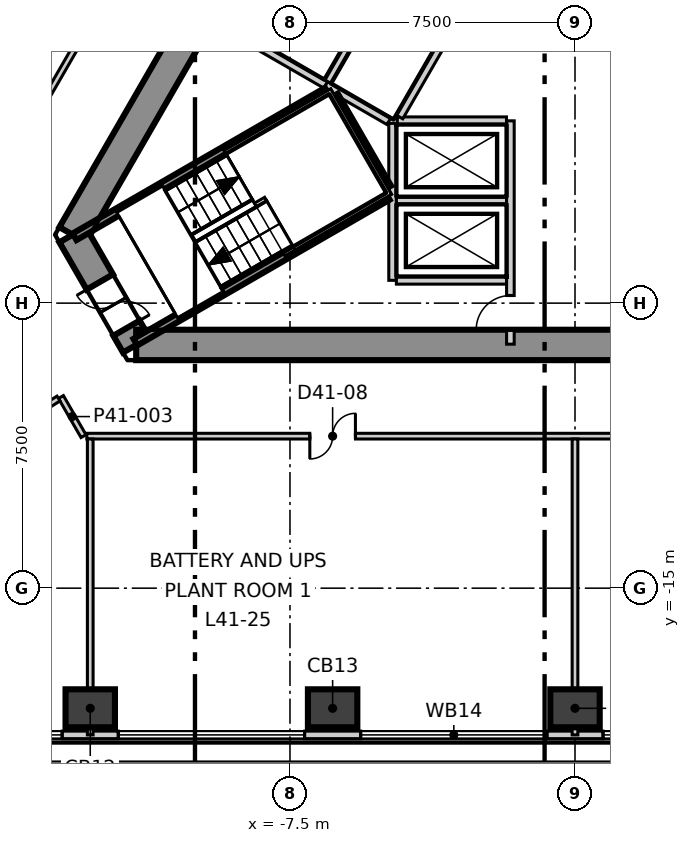
"""IFC4 building model, lengths in metres.
Left out: names, types, materials, properties, quantities, classifications, styles, units other than length and angle.
Written with IfcOpenShell. Run it as: python <this file> out.ifc"""

import sys

from ifc_helpers import new_model, si_unit, direction, frame, frame_2d, origin, origin_2d, place, context, subcontext, project, spatial, polyline, rectangle, outline, extrude, element, fill, save


model = new_model("IFC4")
c1 = context("Model", 3, precision=1e-05, world=origin(), true_north=direction((0.0, 1.0)))
c2 = subcontext(c1, "Body", "Model", "MODEL_VIEW")
j1 = project(units=[si_unit("LENGTHUNIT", "METRE"), si_unit("PLANEANGLEUNIT", "RADIAN")], contexts=[c1])
p1 = place(None, origin())
s1 = spatial("IfcSite", under=j1, at=p1, CompositionType="ELEMENT")
p2 = place(p1, origin())
s2 = spatial("IfcBuilding", under=s1, at=p2, CompositionType="ELEMENT")
p3 = place(p2, frame((0.0, 0.0, 176.3)))
s3 = spatial("IfcBuildingStorey", under=s2, at=p3, CompositionType="ELEMENT", Elevation=176.3)
p4 = place(p3, frame((-1.674, 14.3, -0.3), z_axis=(0.0, 0.0, 1.0), x_axis=(-0.499995765644, -0.866027848477, 0.0)))
e1 = element("IfcWall", 1, at=p4, inside=s3, PredefinedType="SHEAR", context=c2, shape_type="SweptSolid", body=[
    extrude(outline(polyline([(-0.231, -0.4), (1.732, -0.4), (3.695, -0.4), (5.658, -0.4), (7.621, -0.4), (9.584, -0.4), (11.547, -0.4), (13.51, -0.4), (15.473, -0.4), (17.436, -0.4), (19.399, -0.4), (21.362, -0.4), (23.325, -0.4), (22.863, 0.4), (20.977, 0.4), (19.091, 0.4), (17.205, 0.4), (15.319, 0.4), (13.433, 0.4), (11.547, 0.4), (9.661, 0.4), (7.775, 0.4), (5.889, 0.4), (4.003, 0.4), (2.117, 0.4), (0.231, 0.4), (-0.231, -0.4)])), origin(), (0.0, 0.0, 1.0), 4.2),
])
p5 = place(p4, frame((10.997, 0.0, 0.3)))
e2 = element("IfcOpeningElement", 2, at=p5, cuts=e1, PredefinedType="OPENING", context=c2, shape_type="SweptSolid", body=[
    extrude(rectangle(XDim=1.1, YDim=2.1, at=frame_2d((0.55, 1.05))), frame((0.0, 0.41, 0.0), z_axis=(0.0, -1.0, 0.0), x_axis=(1.0, 0.0, 0.0)), (0.0, 0.0, 1.0), 0.82),
])
p6 = place(p3, frame((-13.221, -5.7, -0.3), z_axis=(0.0, 0.0, 1.0), x_axis=(0.49987182685, -0.866099391942, 0.0)))
e3 = element("IfcWall", 3, at=p6, inside=s3, PredefinedType="SHEAR", context=c2, shape_type="SweptSolid", body=[
    extrude(outline(polyline([(-0.231, -0.4), (1.674, -0.4), (3.579, -0.4), (3.118, 0.4), (1.674, 0.4), (0.231, 0.4), (-0.231, -0.4)])), origin(), (0.0, 0.0, 1.0), 4.2),
])
p7 = place(p6, frame((1.437, 0.0, 0.3)))
e4 = element("IfcOpeningElement", 4, at=p7, cuts=e3, PredefinedType="OPENING", context=c2, shape_type="SweptSolid", body=[
    extrude(rectangle(XDim=1.4, YDim=2.1, at=frame_2d((0.7, 1.05))), frame((0.0, 0.41, 0.0), z_axis=(0.0, -1.0, 0.0), x_axis=(1.0, 0.0, 0.0)), (0.0, 0.0, 1.0), 0.82),
])
p8 = place(p3, frame((-11.547, -8.6, -0.3), z_axis=(0.0, 0.0, 1.0), x_axis=(1.0, 0.0, 0.0)))
e5 = element("IfcWall", 5, at=p8, inside=s3, PredefinedType="SHEAR", context=c2, shape_type="SweptSolid", body=[
    extrude(outline(polyline([(-0.231, -0.4), (1.732, -0.4), (3.695, -0.4), (5.658, -0.4), (7.621, -0.4), (9.584, -0.4), (11.547, -0.4), (13.51, -0.4), (15.473, -0.4), (17.436, -0.4), (19.399, -0.4), (21.362, -0.4), (23.325, -0.4), (22.863, 0.4), (20.977, 0.4), (19.091, 0.4), (17.205, 0.4), (15.319, 0.4), (13.433, 0.4), (11.547, 0.4), (9.661, 0.4), (7.775, 0.4), (5.889, 0.4), (4.003, 0.4), (2.117, 0.4), (0.231, 0.4), (-0.231, -0.4)])), origin(), (0.0, 0.0, 1.0), 4.2),
])
for number, where, z_axis, x_axis in (
    (6, (-12.756, -18.161, -0.3), (0.0, 0.0, 1.0), (1.0, 0.0, 0.0)),
    (7, (-6.378, -18.161, -0.3), (0.0, 0.0, 1.0), (1.0, 0.0, 0.0)),
    (8, (0.0, -18.161, -0.3), (0.0, 0.0, 1.0), (1.0, 0.0, 0.0)),
):
    element("IfcColumn", number, at=place(p3, frame(where, z_axis=z_axis, x_axis=x_axis)), inside=s3, PredefinedType="COLUMN", context=c2, shape_type="SweptSolid", body=[
        extrude(rectangle(XDim=1.3, YDim=1.0, at=origin_2d()), origin(), (0.0, 0.0, 1.0), 4.2),
    ])
p9 = place(p3, frame((-2.926, 32.654, 0.0), z_axis=(0.0, 0.0, 1.0), x_axis=(-0.499994049952, -0.866028839019, 0.0)))
e9 = element("IfcWall", 9, at=p9, inside=s3, PredefinedType="ELEMENTEDWALL", context=c2, shape_type="SweptSolid", body=[
    extrude(rectangle(XDim=53.613, YDim=0.2, at=frame_2d((26.806, 0.0))), origin(), (0.0, 0.0, 1.0), 3.9),
])
p10 = place(p9, frame((2.042, 0.0, 0.9)))
e10 = element("IfcOpeningElement", 10, at=p10, cuts=e9, PredefinedType="OPENING", context=c2, shape_type="SweptSolid", body=[
    extrude(rectangle(XDim=4.9, YDim=2.5, at=frame_2d((2.45, 1.25))), frame((0.0, 0.11, 0.0), z_axis=(0.0, -1.0, 0.0), x_axis=(1.0, 0.0, 0.0)), (0.0, 0.0, 1.0), 0.22),
])
p11 = place(p9, frame((8.42, 0.0, 0.9)))
e11 = element("IfcOpeningElement", 11, at=p11, cuts=e9, PredefinedType="OPENING", context=c2, shape_type="SweptSolid", body=[
    extrude(rectangle(XDim=4.9, YDim=2.5, at=frame_2d((2.45, 1.25))), frame((0.0, 0.11, 0.0), z_axis=(0.0, -1.0, 0.0), x_axis=(1.0, 0.0, 0.0)), (0.0, 0.0, 1.0), 0.22),
])
p12 = place(p9, frame((14.798, 0.0, 0.9)))
e12 = element("IfcOpeningElement", 12, at=p12, cuts=e9, PredefinedType="OPENING", context=c2, shape_type="SweptSolid", body=[
    extrude(rectangle(XDim=4.9, YDim=2.5, at=frame_2d((2.45, 1.25))), frame((0.0, 0.11, 0.0), z_axis=(0.0, -1.0, 0.0), x_axis=(1.0, 0.0, 0.0)), (0.0, 0.0, 1.0), 0.22),
])
p13 = place(p9, frame((21.177, 0.0, 0.9)))
e13 = element("IfcOpeningElement", 13, at=p13, cuts=e9, PredefinedType="OPENING", context=c2, shape_type="SweptSolid", body=[
    extrude(rectangle(XDim=4.9, YDim=2.5, at=frame_2d((2.45, 1.25))), frame((0.0, 0.11, 0.0), z_axis=(0.0, -1.0, 0.0), x_axis=(1.0, 0.0, 0.0)), (0.0, 0.0, 1.0), 0.22),
])
p14 = place(p9, frame((27.555, 0.0, 0.9)))
e14 = element("IfcOpeningElement", 14, at=p14, cuts=e9, PredefinedType="OPENING", context=c2, shape_type="SweptSolid", body=[
    extrude(rectangle(XDim=4.9, YDim=2.5, at=frame_2d((2.45, 1.25))), frame((0.0, 0.11, 0.0), z_axis=(0.0, -1.0, 0.0), x_axis=(1.0, 0.0, 0.0)), (0.0, 0.0, 1.0), 0.22),
])
p15 = place(p9, frame((33.934, 0.0, 0.9)))
e15 = element("IfcOpeningElement", 15, at=p15, cuts=e9, PredefinedType="OPENING", context=c2, shape_type="SweptSolid", body=[
    extrude(rectangle(XDim=4.9, YDim=2.5, at=frame_2d((2.45, 1.25))), frame((0.0, 0.11, 0.0), z_axis=(0.0, -1.0, 0.0), x_axis=(1.0, 0.0, 0.0)), (0.0, 0.0, 1.0), 0.22),
])
p16 = place(p9, frame((40.312, 0.0, 0.9)))
e16 = element("IfcOpeningElement", 16, at=p16, cuts=e9, PredefinedType="OPENING", context=c2, shape_type="SweptSolid", body=[
    extrude(rectangle(XDim=4.9, YDim=2.5, at=frame_2d((2.45, 1.25))), frame((0.0, 0.11, 0.0), z_axis=(0.0, -1.0, 0.0), x_axis=(1.0, 0.0, 0.0)), (0.0, 0.0, 1.0), 0.22),
])
p17 = place(p9, frame((46.69, 0.0, 0.9)))
e17 = element("IfcOpeningElement", 17, at=p17, cuts=e9, PredefinedType="OPENING", context=c2, shape_type="SweptSolid", body=[
    extrude(rectangle(XDim=4.9, YDim=2.5, at=frame_2d((2.45, 1.25))), frame((0.0, 0.11, 0.0), z_axis=(0.0, -1.0, 0.0), x_axis=(1.0, 0.0, 0.0)), (0.0, 0.0, 1.0), 0.22),
])
p18 = place(p3, frame((-26.816, -18.861, 0.0), z_axis=(0.0, 0.0, 1.0), x_axis=(1.0, 0.0, 0.0)))
e18 = element("IfcWall", 18, at=p18, inside=s3, PredefinedType="ELEMENTEDWALL", context=c2, shape_type="SweptSolid", body=[
    extrude(rectangle(XDim=53.612, YDim=0.2, at=frame_2d((26.806, 0.0))), origin(), (0.0, 0.0, 1.0), 3.9),
])
p19 = place(p18, frame((2.042, 0.0, 0.9)))
e19 = element("IfcOpeningElement", 19, at=p19, cuts=e18, PredefinedType="OPENING", context=c2, shape_type="SweptSolid", body=[
    extrude(rectangle(XDim=4.9, YDim=2.5, at=frame_2d((2.45, 1.25))), frame((0.0, 0.11, 0.0), z_axis=(0.0, -1.0, 0.0), x_axis=(1.0, 0.0, 0.0)), (0.0, 0.0, 1.0), 0.22),
])
p20 = place(p18, frame((8.42, 0.0, 0.9)))
e20 = element("IfcOpeningElement", 20, at=p20, cuts=e18, PredefinedType="OPENING", context=c2, shape_type="SweptSolid", body=[
    extrude(rectangle(XDim=4.9, YDim=2.5, at=frame_2d((2.45, 1.25))), frame((0.0, 0.11, 0.0), z_axis=(0.0, -1.0, 0.0), x_axis=(1.0, 0.0, 0.0)), (0.0, 0.0, 1.0), 0.22),
])
p21 = place(p18, frame((14.799, 0.0, 0.9)))
e21 = element("IfcOpeningElement", 21, at=p21, cuts=e18, PredefinedType="OPENING", context=c2, shape_type="SweptSolid", body=[
    extrude(rectangle(XDim=4.9, YDim=2.5, at=frame_2d((2.45, 1.25))), frame((0.0, 0.11, 0.0), z_axis=(0.0, -1.0, 0.0), x_axis=(1.0, 0.0, 0.0)), (0.0, 0.0, 1.0), 0.22),
])
p22 = place(p18, frame((21.177, 0.0, 0.9)))
e22 = element("IfcOpeningElement", 22, at=p22, cuts=e18, PredefinedType="OPENING", context=c2, shape_type="SweptSolid", body=[
    extrude(rectangle(XDim=4.9, YDim=2.5, at=frame_2d((2.45, 1.25))), frame((0.0, 0.11, 0.0), z_axis=(0.0, -1.0, 0.0), x_axis=(1.0, 0.0, 0.0)), (0.0, 0.0, 1.0), 0.22),
])
p23 = place(p18, frame((27.555, 0.0, 0.9)))
e23 = element("IfcOpeningElement", 23, at=p23, cuts=e18, PredefinedType="OPENING", context=c2, shape_type="SweptSolid", body=[
    extrude(rectangle(XDim=4.9, YDim=2.5, at=frame_2d((2.45, 1.25))), frame((0.0, 0.11, 0.0), z_axis=(0.0, -1.0, 0.0), x_axis=(1.0, 0.0, 0.0)), (0.0, 0.0, 1.0), 0.22),
])
p24 = place(p18, frame((33.933, 0.0, 0.9)))
e24 = element("IfcOpeningElement", 24, at=p24, cuts=e18, PredefinedType="OPENING", context=c2, shape_type="SweptSolid", body=[
    extrude(rectangle(XDim=4.9, YDim=2.5, at=frame_2d((2.45, 1.25))), frame((0.0, 0.11, 0.0), z_axis=(0.0, -1.0, 0.0), x_axis=(1.0, 0.0, 0.0)), (0.0, 0.0, 1.0), 0.22),
])
p25 = place(p18, frame((40.312, 0.0, 0.9)))
e25 = element("IfcOpeningElement", 25, at=p25, cuts=e18, PredefinedType="OPENING", context=c2, shape_type="SweptSolid", body=[
    extrude(rectangle(XDim=4.9, YDim=2.5, at=frame_2d((2.45, 1.25))), frame((0.0, 0.11, 0.0), z_axis=(0.0, -1.0, 0.0), x_axis=(1.0, 0.0, 0.0)), (0.0, 0.0, 1.0), 0.22),
])
p26 = place(p18, frame((46.69, 0.0, 0.9)))
e26 = element("IfcOpeningElement", 26, at=p26, cuts=e18, PredefinedType="OPENING", context=c2, shape_type="SweptSolid", body=[
    extrude(rectangle(XDim=4.9, YDim=2.5, at=frame_2d((2.45, 1.25))), frame((0.0, 0.11, 0.0), z_axis=(0.0, -1.0, 0.0), x_axis=(1.0, 0.0, 0.0)), (0.0, 0.0, 1.0), 0.22),
])
p27 = place(p3, frame((-15.993, -5.7, 0.0), z_axis=(0.0, 0.0, 1.0), x_axis=(0.500007877715, 0.866020855536, 0.0)))
e27 = element("IfcWall", 27, at=p27, inside=s3, PredefinedType="PARTITIONING", context=c2, shape_type="SweptSolid", body=[
    extrude(rectangle(XDim=25.865, YDim=0.15, at=frame_2d((12.933, 0.0))), origin(), (0.0, 0.0, 1.0), 3.9),
])
p28 = place(p27, frame((21.988, 0.0, 0.0)))
e28 = element("IfcOpeningElement", 28, at=p28, cuts=e27, PredefinedType="OPENING", context=c2, shape_type="SweptSolid", body=[
    extrude(rectangle(XDim=1.2, YDim=2.1, at=frame_2d((0.6, 1.05))), frame((0.0, 0.085, 0.0), z_axis=(0.0, -1.0, 0.0), x_axis=(1.0, 0.0, 0.0)), (0.0, 0.0, 1.0), 0.17),
])
p29 = place(p27, frame((15.622, 0.0, 0.0)))
e29 = element("IfcOpeningElement", 29, at=p29, cuts=e27, PredefinedType="OPENING", context=c2, shape_type="SweptSolid", body=[
    extrude(rectangle(XDim=1.0, YDim=2.1, at=frame_2d((0.5, 1.05))), frame((0.0, 0.085, 0.0), z_axis=(0.0, -1.0, 0.0), x_axis=(1.0, 0.0, 0.0)), (0.0, 0.0, 1.0), 0.17),
])
p30 = place(p27, frame((9.244, 0.0, 0.0)))
e30 = element("IfcOpeningElement", 30, at=p30, cuts=e27, PredefinedType="OPENING", context=c2, shape_type="SweptSolid", body=[
    extrude(rectangle(XDim=1.0, YDim=2.1, at=frame_2d((0.5, 1.05))), frame((0.0, 0.085, 0.0), z_axis=(0.0, -1.0, 0.0), x_axis=(1.0, 0.0, 0.0)), (0.0, 0.0, 1.0), 0.17),
])
p31 = place(p27, frame((2.678, 0.0, 0.0)))
e31 = element("IfcOpeningElement", 31, at=p31, cuts=e27, PredefinedType="OPENING", context=c2, shape_type="SweptSolid", body=[
    extrude(rectangle(XDim=1.2, YDim=2.1, at=frame_2d((0.6, 1.05))), frame((0.0, 0.085, 0.0), z_axis=(0.0, -1.0, 0.0), x_axis=(1.0, 0.0, 0.0)), (0.0, 0.0, 1.0), 0.17),
])
p32 = place(p3, frame((-13.527, -9.97, 0.0), z_axis=(0.0, 0.0, 1.0), x_axis=(0.499562467058, -0.866277866222, 0.0)))
e32 = element("IfcWall", 32, at=p32, inside=s3, PredefinedType="PARTITIONING", context=c2, shape_type="SweptSolid", body=[
    extrude(rectangle(XDim=1.189, YDim=0.15, at=frame_2d((0.594, 0.0))), origin(), (0.0, 0.0, 1.0), 3.9),
])
p33 = place(p3, frame((-26.227, -17.998, 0.0), z_axis=(0.0, 0.0, 1.0), x_axis=(0.845264910481, 0.534347481616, 0.0)))
e33 = element("IfcWall", 33, at=p33, inside=s3, PredefinedType="PARTITIONING", context=c2, shape_type="SweptSolid", body=[
    extrude(rectangle(XDim=14.949, YDim=0.15, at=frame_2d((7.475, 0.0))), origin(), (0.0, 0.0, 1.0), 3.2),
])
p34 = place(p33, frame((13.008, 0.0, 0.0)))
e34 = element("IfcOpeningElement", 34, at=p34, cuts=e33, PredefinedType="OPENING", context=c2, shape_type="SweptSolid", body=[
    extrude(rectangle(XDim=1.0, YDim=2.1, at=frame_2d((0.5, 1.05))), frame((0.0, 0.085, 0.0), z_axis=(0.0, -1.0, 0.0), x_axis=(1.0, 0.0, 0.0)), (0.0, 0.0, 1.0), 0.17),
])
p35 = place(p3, frame((-12.846, -11.0, 0.0), z_axis=(0.0, 0.0, 1.0), x_axis=(1.0, 0.0, 0.0)))
e35 = element("IfcWall", 35, at=p35, inside=s3, PredefinedType="PARTITIONING", context=c2, shape_type="SweptSolid", body=[
    extrude(rectangle(XDim=25.779, YDim=0.15, at=frame_2d((12.89, 0.0))), origin(), (0.0, 0.0, 1.0), 3.9),
])
p36 = place(p35, frame((5.868, 0.0, 0.0)))
e36 = element("IfcOpeningElement", 36, at=p36, cuts=e35, PredefinedType="OPENING", context=c2, shape_type="SweptSolid", body=[
    extrude(rectangle(XDim=1.2, YDim=2.1, at=frame_2d((0.6, 1.05))), frame((0.0, 0.085, 0.0), z_axis=(0.0, -1.0, 0.0), x_axis=(1.0, 0.0, 0.0)), (0.0, 0.0, 1.0), 0.17),
])
p37 = place(p35, frame((18.624, 0.0, 0.0)))
e37 = element("IfcOpeningElement", 37, at=p37, cuts=e35, PredefinedType="OPENING", context=c2, shape_type="SweptSolid", body=[
    extrude(rectangle(XDim=1.2, YDim=2.1, at=frame_2d((0.6, 1.05))), frame((0.0, 0.085, 0.0), z_axis=(0.0, -1.0, 0.0), x_axis=(1.0, 0.0, 0.0)), (0.0, 0.0, 1.0), 0.17),
])
p38 = place(p3, frame((-12.756, -18.861, 0.0), z_axis=(0.0, 0.0, 1.0), x_axis=(0.0, 1.0, 0.0)))
e38 = element("IfcWall", 38, at=p38, inside=s3, PredefinedType="PARTITIONING", context=c2, shape_type="SweptSolid", body=[
    extrude(rectangle(XDim=7.786, YDim=0.15, at=frame_2d((3.893, 0.0))), origin(), (0.0, 0.0, 1.0), 3.9),
])
p39 = place(p3, frame((0.0, -18.861, 0.0), z_axis=(0.0, 0.0, 1.0), x_axis=(0.0, 1.0, 0.0)))
e39 = element("IfcWall", 39, at=p39, inside=s3, PredefinedType="PARTITIONING", context=c2, shape_type="SweptSolid", body=[
    extrude(rectangle(XDim=7.786, YDim=0.15, at=frame_2d((3.893, 0.0))), origin(), (0.0, 0.0, 1.0), 3.4),
])
p40 = place(p3, frame((-8.376, -0.707, 0.0), z_axis=(0.0, 0.0, 1.0), x_axis=(0.866067520717, -0.499927044236, 0.0)))
e40 = element("IfcWall", 40, at=p40, inside=s3, PredefinedType="SOLIDWALL", context=c2, shape_type="SweptSolid", body=[
    extrude(rectangle(XDim=2.1, YDim=0.2, at=frame_2d((1.05, 0.0))), origin(), (0.0, 0.0, 1.0), 3.9),
])
p41 = place(p3, frame((-4.8, -6.9, 0.0), z_axis=(0.0, 0.0, 1.0), x_axis=(0.0, 1.0, 0.0)))
e41 = element("IfcWall", 41, at=p41, inside=s3, PredefinedType="SOLIDWALL", context=c2, shape_type="SweptSolid", body=[
    extrude(rectangle(XDim=4.131, YDim=0.2, at=frame_2d((2.065, 0.0))), origin(), (0.0, 0.0, 1.0), 3.9),
])
for number, where, z_axis, x_axis in (
    (42, (-4.7, -6.9, 0.0), (0.0, 0.0, 1.0), (1.0, 0.0, 0.0)),
    (43, (-4.7, -4.8, 0.0), (0.0, 0.0, 1.0), (1.0, 0.0, 0.0)),
):
    element("IfcWall", number, at=place(p3, frame(where, z_axis=z_axis, x_axis=x_axis)), inside=s3, PredefinedType="SOLIDWALL", context=c2, shape_type="SweptSolid", body=[
        extrude(rectangle(XDim=2.9, YDim=0.2, at=frame_2d((1.45, 0.0))), origin(), (0.0, 0.0, 1.0), 3.9),
    ])
p42 = place(p3, frame((-1.7, -8.58, 0.0), z_axis=(0.0, 0.0, 1.0), x_axis=(0.0, 1.0, 0.0)))
e44 = element("IfcWall", 44, at=p42, inside=s3, PredefinedType="SOLIDWALL", context=c2, shape_type="SweptSolid", body=[
    extrude(rectangle(XDim=5.877, YDim=0.2, at=frame_2d((2.938, 0.0))), origin(), (0.0, 0.0, 1.0), 3.9),
])
p43 = place(p42, frame((0.38, 0.0, 0.0)))
e45 = element("IfcOpeningElement", 45, at=p43, cuts=e44, PredefinedType="OPENING", context=c2, shape_type="SweptSolid", body=[
    extrude(rectangle(XDim=0.9, YDim=2.1, at=frame_2d((0.45, 1.05))), frame((0.0, 0.11, 0.0), z_axis=(0.0, -1.0, 0.0), x_axis=(1.0, 0.0, 0.0)), (0.0, 0.0, 1.0), 0.22),
])
p44 = place(p3, frame((-4.676, -2.7, 0.0), z_axis=(0.0, 0.0, 1.0), x_axis=(1.0, 0.0, 0.0)))
e46 = element("IfcWall", 46, at=p44, inside=s3, PredefinedType="SOLIDWALL", context=c2, shape_type="SweptSolid", body=[
    extrude(rectangle(XDim=2.873, YDim=0.2, at=frame_2d((1.437, 0.0))), origin(), (0.0, 0.0, 1.0), 3.9),
])
p45 = place(p3, frame((-6.557, -1.757, 0.0), z_axis=(0.0, 0.0, 1.0), x_axis=(0.8659754619, -0.500086491905, 0.0)))
e47 = element("IfcWall", 47, at=p45, inside=s3, PredefinedType="SOLIDWALL", context=c2, shape_type="SweptSolid", body=[
    extrude(rectangle(XDim=1.916, YDim=0.2, at=frame_2d((0.958, 0.0))), origin(), (0.0, 0.0, 1.0), 3.9),
])
p46 = place(p3, frame((-6.507, -1.67, 0.0), z_axis=(0.0, 0.0, 1.0), x_axis=(0.50012328804, 0.865954211699, 0.0)))
e48 = element("IfcWall", 48, at=p46, inside=s3, PredefinedType="SOLIDWALL", context=c2, shape_type="SweptSolid", body=[
    extrude(rectangle(XDim=2.9, YDim=0.2, at=frame_2d((1.45, 0.0))), origin(), (0.0, 0.0, 1.0), 3.9),
])
p47 = place(p3, frame((-4.619, -2.6, 0.0), z_axis=(0.0, 0.0, 1.0), x_axis=(0.50009492287, 0.865970593103, 0.0)))
e49 = element("IfcWall", 49, at=p47, inside=s3, PredefinedType="SOLIDWALL", context=c2, shape_type="SweptSolid", body=[
    extrude(rectangle(XDim=2.761, YDim=0.2, at=frame_2d((1.381, 0.0))), origin(), (0.0, 0.0, 1.0), 3.9),
])
p48 = place(p3, frame((-13.167, -5.754, 0.0), z_axis=(0.0, 0.0, 1.0), x_axis=(0.866060938598, 0.499938446846, 0.0)))
e50 = element("IfcWall", 50, at=p48, inside=s3, PredefinedType="SOLIDWALL", context=c2, shape_type="SweptSolid", body=[
    extrude(rectangle(XDim=7.665, YDim=0.2, at=frame_2d((3.832, 0.0))), origin(), (0.0, 0.0, 1.0), 3.9),
])
p49 = place(p3, frame((-6.329, -2.038, 0.0), z_axis=(0.0, 0.0, 1.0), x_axis=(0.500200581029, -0.865909567298, 0.0)))
e51 = element("IfcWall", 51, at=p49, inside=s3, PredefinedType="SOLIDWALL", context=c2, shape_type="SweptSolid", body=[
    extrude(rectangle(XDim=2.799, YDim=0.2, at=frame_2d((1.399, 0.0))), origin(), (0.0, 0.0, 1.0), 3.9),
])
p50 = place(p3, frame((-11.567, -8.526, 0.0), z_axis=(0.0, 0.0, 1.0), x_axis=(0.866005769735, 0.50003400563, 0.0)))
e52 = element("IfcWall", 52, at=p50, inside=s3, PredefinedType="SOLIDWALL", context=c2, shape_type="SweptSolid", body=[
    extrude(rectangle(XDim=7.665, YDim=0.2, at=frame_2d((3.833, 0.0))), origin(), (0.0, 0.0, 1.0), 3.9),
])
p51 = place(p20, origin())
e53 = element("IfcWindow", 53, at=p51, inside=s3, PartitioningType="SINGLE_PANEL", PredefinedType="WINDOW", context=c2, shape_type="SweptSolid", body=[
    extrude(rectangle(XDim=4.9, YDim=2.5, at=frame_2d((2.45, 1.25))), frame((0.0, 0.03, 0.0), z_axis=(0.0, -1.0, 0.0), x_axis=(1.0, 0.0, 0.0)), (0.0, 0.0, 1.0), 0.06),
])
fill(e20, e53)
p52 = place(p21, origin())
e54 = element("IfcWindow", 54, at=p52, inside=s3, PartitioningType="SINGLE_PANEL", PredefinedType="WINDOW", context=c2, shape_type="SweptSolid", body=[
    extrude(rectangle(XDim=4.9, YDim=2.5, at=frame_2d((2.45, 1.25))), frame((0.0, 0.03, 0.0), z_axis=(0.0, -1.0, 0.0), x_axis=(1.0, 0.0, 0.0)), (0.0, 0.0, 1.0), 0.06),
])
fill(e21, e54)
p53 = place(p22, origin())
e55 = element("IfcWindow", 55, at=p53, inside=s3, PartitioningType="SINGLE_PANEL", PredefinedType="WINDOW", context=c2, shape_type="SweptSolid", body=[
    extrude(rectangle(XDim=4.9, YDim=2.5, at=frame_2d((2.45, 1.25))), frame((0.0, 0.03, 0.0), z_axis=(0.0, -1.0, 0.0), x_axis=(1.0, 0.0, 0.0)), (0.0, 0.0, 1.0), 0.06),
])
fill(e22, e55)
p54 = place(p23, origin())
e56 = element("IfcWindow", 56, at=p54, inside=s3, PartitioningType="SINGLE_PANEL", PredefinedType="WINDOW", context=c2, shape_type="SweptSolid", body=[
    extrude(rectangle(XDim=4.9, YDim=2.5, at=frame_2d((2.45, 1.25))), frame((0.0, 0.03, 0.0), z_axis=(0.0, -1.0, 0.0), x_axis=(1.0, 0.0, 0.0)), (0.0, 0.0, 1.0), 0.06),
])
fill(e23, e56)
p55 = place(p36, origin())
e57 = element("IfcDoor", 57, at=p55, inside=s3, OperationType="DOUBLE_DOOR_SINGLE_SWING", PredefinedType="DOOR", context=c2, shape_type="SweptSolid", body=[
    extrude(rectangle(XDim=1.2, YDim=2.1, at=frame_2d((0.6, 1.05))), frame((0.0, 0.025, 0.0), z_axis=(0.0, -1.0, 0.0), x_axis=(1.0, 0.0, 0.0)), (0.0, 0.0, 1.0), 0.05),
])
fill(e36, e57)
p56 = place(p7, origin())
e58 = element("IfcDoor", 58, at=p56, inside=s3, OperationType="DOUBLE_DOOR_SINGLE_SWING", PredefinedType="DOOR", context=c2, shape_type="SweptSolid", body=[
    extrude(rectangle(XDim=1.4, YDim=2.1, at=frame_2d((0.7, 1.05))), frame((0.0, 0.025, 0.0), z_axis=(0.0, -1.0, 0.0), x_axis=(1.0, 0.0, 0.0)), (0.0, 0.0, 1.0), 0.05),
])
fill(e4, e58)
p57 = place(p43, origin())
e59 = element("IfcDoor", 59, at=p57, inside=s3, OperationType="SINGLE_SWING_RIGHT", PredefinedType="DOOR", context=c2, shape_type="SweptSolid", body=[
    extrude(rectangle(XDim=0.9, YDim=2.1, at=frame_2d((0.45, 1.05))), frame((0.0, 0.025, 0.0), z_axis=(0.0, -1.0, 0.0), x_axis=(1.0, 0.0, 0.0)), (0.0, 0.0, 1.0), 0.05),
])
fill(e45, e59)
save(model, sys.argv[1])
